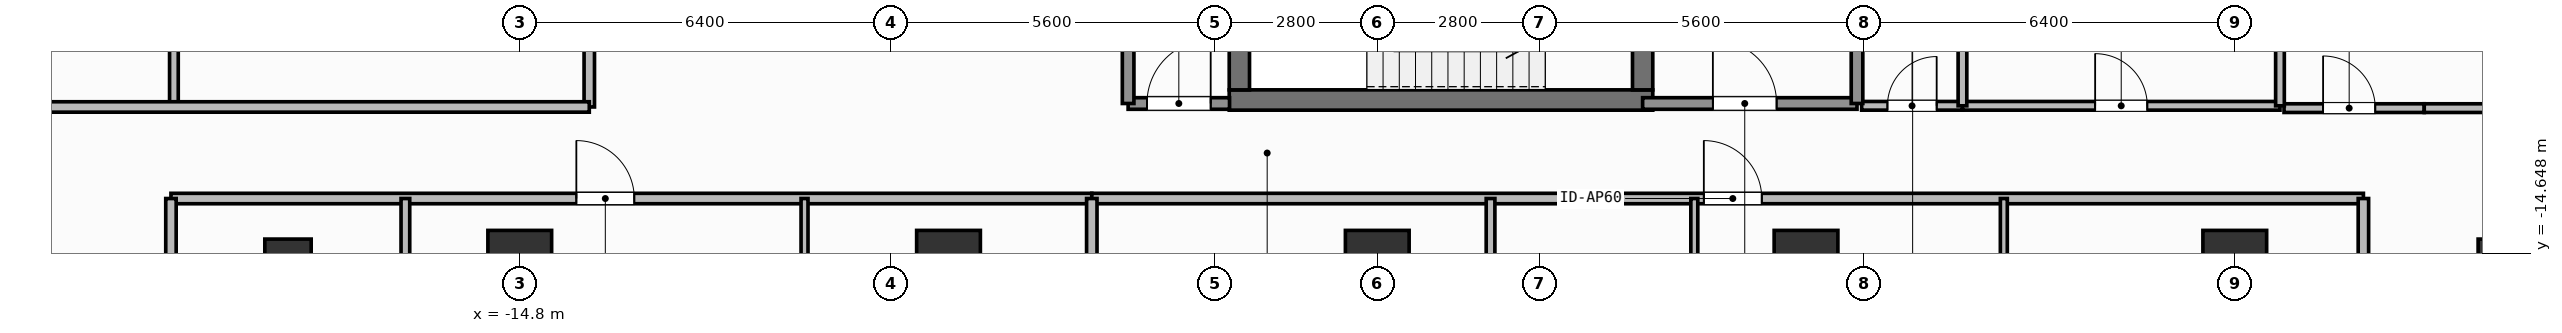
"""IFC4 building model, lengths in metres.
Left out: names, types, materials, properties, quantities, classifications, styles, units other than length and angle.
Written with IfcOpenShell. Run it as: python <this file> out.ifc"""

import sys

from ifc_helpers import new_model, si_unit, direction, frame, frame_2d, origin, origin_2d, place, context, subcontext, project, spatial, rectangle, hollow_rectangle, extrude, element, fill, save


model = new_model("IFC4")
c1 = context("Model", 3, precision=1e-05, world=origin(), true_north=direction((0.0, 1.0)))
c2 = subcontext(c1, "Body", "Model", "MODEL_VIEW")
j1 = project(units=[si_unit("LENGTHUNIT", "METRE"), si_unit("PLANEANGLEUNIT", "RADIAN")], contexts=[c1])
p1 = place(None, origin())
s1 = spatial("IfcSite", under=j1, at=p1, CompositionType="ELEMENT")
p2 = place(p1, origin())
s2 = spatial("IfcBuilding", under=s1, at=p2, CompositionType="ELEMENT")
p3 = place(p2, frame((0.0, 0.0, 199.2)))
s3 = spatial("IfcBuildingStorey", under=s2, at=p3, CompositionType="ELEMENT", Elevation=199.2)
p4 = place(p3, frame((-2.555, -12.0, 0.0), z_axis=(0.0, 0.0, 1.0), x_axis=(1.0, 0.0, 0.0)))
e1 = element("IfcWall", 1, at=p4, inside=s3, PredefinedType="SHEAR", context=c2, shape_type="SweptSolid", body=[
    extrude(rectangle(XDim=7.31, YDim=0.35, at=frame_2d((3.655, 0.0))), origin(), (0.0, 0.0, 1.0), 3.9),
])
p5 = place(p3, frame((-2.38, -11.825, 0.0), z_axis=(0.0, 0.0, 1.0), x_axis=(0.0, 1.0, 0.0)))
e2 = element("IfcWall", 2, at=p5, inside=s3, PredefinedType="SHEAR", context=c2, shape_type="SweptSolid", body=[
    extrude(rectangle(XDim=2.925, YDim=0.35, at=frame_2d((1.462, 0.0))), origin(), (0.0, 0.0, 1.0), 3.9),
])
p6 = place(p3, frame((4.58, -8.9, 0.0), z_axis=(0.0, 0.0, 1.0), x_axis=(0.0, -1.0, 0.0)))
e3 = element("IfcWall", 3, at=p6, inside=s3, PredefinedType="SHEAR", context=c2, shape_type="SweptSolid", body=[
    extrude(rectangle(XDim=2.925, YDim=0.35, at=frame_2d((1.462, 0.0))), origin(), (0.0, 0.0, 1.0), 3.9),
])
p7 = place(p6, frame((0.913, 0.0, 0.0)))
e4 = element("IfcOpeningElement", 4, at=p7, cuts=e3, PredefinedType="OPENING", context=c2, shape_type="SweptSolid", body=[
    extrude(rectangle(XDim=1.1, YDim=2.15, at=frame_2d((0.55, 1.075))), frame((0.0, 0.185, 0.0), z_axis=(0.0, -1.0, 0.0), x_axis=(1.0, 0.0, 0.0)), (0.0, 0.0, 1.0), 0.37),
])
for number, where, z_axis, x_axis in (
    (5, (-14.8, -14.8, 0.0), (0.0, 0.0, 1.0), (1.0, 0.0, 0.0)),
    (6, (-7.4, -14.8, 0.0), (0.0, 0.0, 1.0), (1.0, 0.0, 0.0)),
    (7, (0.0, -14.8, 0.0), (0.0, 0.0, 1.0), (1.0, 0.0, 0.0)),
    (8, (7.4, -14.8, 0.0), (0.0, 0.0, 1.0), (1.0, 0.0, 0.0)),
    (9, (14.8, -14.8, 0.0), (0.0, 0.0, 1.0), (1.0, 0.0, 0.0)),
):
    element("IfcColumn", number, at=place(p3, frame(where, z_axis=z_axis, x_axis=x_axis)), inside=s3, PredefinedType="COLUMN", context=c2, shape_type="SweptSolid", body=[
        extrude(rectangle(XDim=1.1, YDim=1.1, at=origin_2d()), origin(), (0.0, 0.0, 1.0), 3.9),
    ])
for number, where, z_axis, x_axis in (
    (10, (-18.8, -14.8, 0.0), (0.0, 0.0, 1.0), (1.0, 0.0, 0.0)),
    (11, (19.4, -14.8, 0.0), (0.0, 0.0, 1.0), (1.0, 0.0, 0.0)),
):
    element("IfcColumn", number, at=place(p3, frame(where, z_axis=z_axis, x_axis=x_axis)), inside=s3, PredefinedType="COLUMN", context=c2, shape_type="SweptSolid", body=[
        extrude(hollow_rectangle(XDim=0.8, YDim=0.8, WallThickness=0.036, at=origin_2d()), origin(), (0.0, 0.0, 1.0), 3.9),
    ])
p8 = place(p3, frame((4.58, -12.06, 0.0), z_axis=(0.0, 0.0, 1.0), x_axis=(1.0, 0.0, 0.0)))
e12 = element("IfcWall", 12, at=p8, inside=s3, PredefinedType="SOLIDWALL", context=c2, shape_type="SweptSolid", body=[
    extrude(rectangle(XDim=3.7, YDim=0.2, at=frame_2d((1.85, 0.0))), origin(), (0.0, 0.0, 1.0), 3.68),
])
p9 = place(p8, frame((1.212, 0.0, 0.0)))
e13 = element("IfcOpeningElement", 13, at=p9, cuts=e12, PredefinedType="OPENING", context=c2, shape_type="SweptSolid", body=[
    extrude(rectangle(XDim=1.1, YDim=2.15, at=frame_2d((0.55, 1.075))), frame((0.0, 0.11, 0.0), z_axis=(0.0, -1.0, 0.0), x_axis=(1.0, 0.0, 0.0)), (0.0, 0.0, 1.0), 0.22),
])
p10 = place(p3, frame((-4.3, -12.06, 0.0), z_axis=(0.0, 0.0, 1.0), x_axis=(1.0, 0.0, 0.0)))
e14 = element("IfcWall", 14, at=p10, inside=s3, PredefinedType="SOLIDWALL", context=c2, shape_type="SweptSolid", body=[
    extrude(rectangle(XDim=1.75, YDim=0.2, at=frame_2d((0.875, 0.0))), origin(), (0.0, 0.0, 1.0), 3.68),
])
p11 = place(p10, frame((0.325, 0.0, 0.0)))
e15 = element("IfcOpeningElement", 15, at=p11, cuts=e14, PredefinedType="OPENING", context=c2, shape_type="SweptSolid", body=[
    extrude(rectangle(XDim=1.1, YDim=2.15, at=frame_2d((0.55, 1.075))), frame((0.0, 0.11, 0.0), z_axis=(0.0, -1.0, 0.0), x_axis=(1.0, 0.0, 0.0)), (0.0, 0.0, 1.0), 0.22),
])
p12 = place(p3, frame((8.36, -12.1, 0.0), z_axis=(0.0, 0.0, 1.0), x_axis=(1.0, 0.0, 0.0)))
e16 = element("IfcWall", 16, at=p12, inside=s3, PredefinedType="PARTITIONING", context=c2, shape_type="SweptSolid", body=[
    extrude(rectangle(XDim=1.74, YDim=0.15, at=frame_2d((0.87, 0.0))), origin(), (0.0, 0.0, 1.0), 3.68),
])
p13 = place(p12, frame((0.445, 0.0, 0.0)))
e17 = element("IfcOpeningElement", 17, at=p13, cuts=e16, PredefinedType="OPENING", context=c2, shape_type="SweptSolid", body=[
    extrude(rectangle(XDim=0.85, YDim=2.1, at=frame_2d((0.425, 1.05))), frame((0.0, 0.085, 0.0), z_axis=(0.0, -1.0, 0.0), x_axis=(1.0, 0.0, 0.0)), (0.0, 0.0, 1.0), 0.17),
])
p14 = place(p3, frame((10.1, -12.1, 0.0), z_axis=(0.0, 0.0, 1.0), x_axis=(1.0, 0.0, 0.0)))
e18 = element("IfcWall", 18, at=p14, inside=s3, PredefinedType="PARTITIONING", context=c2, shape_type="SweptSolid", body=[
    extrude(rectangle(XDim=5.48, YDim=0.15, at=frame_2d((2.74, 0.0))), origin(), (0.0, 0.0, 1.0), 3.68),
])
p15 = place(p14, frame((2.29, 0.0, 0.0)))
e19 = element("IfcOpeningElement", 19, at=p15, cuts=e18, PredefinedType="OPENING", context=c2, shape_type="SweptSolid", body=[
    extrude(rectangle(XDim=0.9, YDim=2.1, at=frame_2d((0.45, 1.05))), frame((0.0, 0.085, 0.0), z_axis=(0.0, -1.0, 0.0), x_axis=(1.0, 0.0, 0.0)), (0.0, 0.0, 1.0), 0.17),
])
p16 = place(p3, frame((-20.82, -13.7, 0.0), z_axis=(0.0, 0.0, 1.0), x_axis=(1.0, 0.0, 0.0)))
e20 = element("IfcWall", 20, at=p16, inside=s3, PredefinedType="PARTITIONING", context=c2, shape_type="SweptSolid", body=[
    extrude(rectangle(XDim=15.893, YDim=0.18, at=frame_2d((7.947, 0.0))), origin(), (0.0, 0.0, 1.0), 3.68),
])
p17 = place(p16, frame((6.997, 0.0, 0.0)))
e21 = element("IfcOpeningElement", 21, at=p17, cuts=e20, PredefinedType="OPENING", context=c2, shape_type="SweptSolid", body=[
    extrude(rectangle(XDim=1.0, YDim=2.2, at=frame_2d((0.5, 1.1))), frame((0.0, 0.1, 0.0), z_axis=(0.0, -1.0, 0.0), x_axis=(1.0, 0.0, 0.0)), (0.0, 0.0, 1.0), 0.2),
])
p18 = place(p3, frame((-16.774, -24.39, 0.0), z_axis=(0.0, 0.0, 1.0), x_axis=(0.0, 1.0, 0.0)))
e22 = element("IfcWall", 22, at=p18, inside=s3, PredefinedType="PARTITIONING", context=c2, shape_type="SweptSolid", body=[
    extrude(rectangle(XDim=10.69, YDim=0.15, at=frame_2d((5.345, 0.0))), origin(), (0.0, 0.0, 1.0), 3.68),
])
p19 = place(p18, frame((4.83, 0.0, 0.0)))
e23 = element("IfcOpeningElement", 23, at=p19, cuts=e22, PredefinedType="OPENING", context=c2, shape_type="SweptSolid", body=[
    extrude(rectangle(XDim=0.85, YDim=2.1, at=frame_2d((0.425, 1.05))), frame((0.0, 0.085, 0.0), z_axis=(0.0, -1.0, 0.0), x_axis=(1.0, 0.0, 0.0)), (0.0, 0.0, 1.0), 0.17),
])
p20 = place(p3, frame((-9.885, -18.19, 0.0), z_axis=(0.0, 0.0, 1.0), x_axis=(0.0, 1.0, 0.0)))
e24 = element("IfcWall", 24, at=p20, inside=s3, PredefinedType="PARTITIONING", context=c2, shape_type="SweptSolid", body=[
    extrude(rectangle(XDim=4.49, YDim=0.12, at=frame_2d((2.245, 0.0))), origin(), (0.0, 0.0, 1.0), 3.68),
])
p21 = place(p20, frame((1.907, 0.0, 0.0)))
e25 = element("IfcOpeningElement", 25, at=p21, cuts=e24, PredefinedType="OPENING", context=c2, shape_type="SweptSolid", body=[
    extrude(rectangle(XDim=0.85, YDim=2.1, at=frame_2d((0.425, 1.05))), frame((0.0, 0.07, 0.0), z_axis=(0.0, -1.0, 0.0), x_axis=(1.0, 0.0, 0.0)), (0.0, 0.0, 1.0), 0.14),
])
p22 = place(p3, frame((-4.927, -13.7, 0.0), z_axis=(0.0, 0.0, 1.0), x_axis=(1.0, 0.0, 0.0)))
e26 = element("IfcWall", 26, at=p22, inside=s3, PredefinedType="PARTITIONING", context=c2, shape_type="SweptSolid", body=[
    extrude(rectangle(XDim=21.947, YDim=0.18, at=frame_2d((10.974, 0.0))), origin(), (0.0, 0.0, 1.0), 3.68),
])
p23 = place(p22, frame((10.563, 0.0, 0.0)))
e27 = element("IfcOpeningElement", 27, at=p23, cuts=e26, PredefinedType="OPENING", context=c2, shape_type="SweptSolid", body=[
    extrude(rectangle(XDim=1.0, YDim=2.2, at=frame_2d((0.5, 1.1))), frame((0.0, 0.1, 0.0), z_axis=(0.0, -1.0, 0.0), x_axis=(1.0, 0.0, 0.0)), (0.0, 0.0, 1.0), 0.2),
])
p24 = place(p3, frame((5.472, -24.39, 0.0), z_axis=(0.0, 0.0, 1.0), x_axis=(0.0, 1.0, 0.0)))
e28 = element("IfcWall", 28, at=p24, inside=s3, PredefinedType="PARTITIONING", context=c2, shape_type="SweptSolid", body=[
    extrude(rectangle(XDim=10.69, YDim=0.12, at=frame_2d((5.345, 0.0))), origin(), (0.0, 0.0, 1.0), 3.68),
])
p25 = place(p24, frame((4.806, 0.0, 0.0)))
e29 = element("IfcOpeningElement", 29, at=p25, cuts=e28, PredefinedType="OPENING", context=c2, shape_type="SweptSolid", body=[
    extrude(rectangle(XDim=0.9, YDim=2.1, at=frame_2d((0.45, 1.05))), frame((0.0, 0.07, 0.0), z_axis=(0.0, -1.0, 0.0), x_axis=(1.0, 0.0, 0.0)), (0.0, 0.0, 1.0), 0.14),
])
p26 = place(p3, frame((1.955, -19.45, 0.0), z_axis=(0.0, 0.0, 1.0), x_axis=(0.0, 1.0, 0.0)))
e30 = element("IfcWall", 30, at=p26, inside=s3, PredefinedType="PARTITIONING", context=c2, shape_type="SweptSolid", body=[
    extrude(rectangle(XDim=5.75, YDim=0.15, at=frame_2d((2.875, 0.0))), origin(), (0.0, 0.0, 1.0), 3.68),
])
p27 = place(p26, frame((2.45, 0.0, 0.0)))
e31 = element("IfcOpeningElement", 31, at=p27, cuts=e30, PredefinedType="OPENING", context=c2, shape_type="SweptSolid", body=[
    extrude(rectangle(XDim=0.85, YDim=2.1, at=frame_2d((0.425, 1.05))), frame((0.0, 0.085, 0.0), z_axis=(0.0, -1.0, 0.0), x_axis=(1.0, 0.0, 0.0)), (0.0, 0.0, 1.0), 0.17),
])
p28 = place(p3, frame((10.814, -18.19, 0.0), z_axis=(0.0, 0.0, 1.0), x_axis=(0.0, 1.0, 0.0)))
e32 = element("IfcWall", 32, at=p28, inside=s3, PredefinedType="PARTITIONING", context=c2, shape_type="SweptSolid", body=[
    extrude(rectangle(XDim=4.49, YDim=0.12, at=frame_2d((2.245, 0.0))), origin(), (0.0, 0.0, 1.0), 3.68),
])
p29 = place(p28, frame((1.907, 0.0, 0.0)))
e33 = element("IfcOpeningElement", 33, at=p29, cuts=e32, PredefinedType="OPENING", context=c2, shape_type="SweptSolid", body=[
    extrude(rectangle(XDim=0.85, YDim=2.1, at=frame_2d((0.425, 1.05))), frame((0.0, 0.07, 0.0), z_axis=(0.0, -1.0, 0.0), x_axis=(1.0, 0.0, 0.0)), (0.0, 0.0, 1.0), 0.14),
])
p30 = place(p3, frame((-13.6, -12.12, 0.0), z_axis=(0.0, 0.0, 1.0), x_axis=(0.0, 1.0, 0.0)))
e34 = element("IfcWall", 34, at=p30, inside=s3, PredefinedType="PARTITIONING", context=c2, shape_type="SweptSolid", body=[
    extrude(rectangle(XDim=12.764, YDim=0.18, at=frame_2d((6.382, 0.0))), origin(), (0.0, 0.0, 1.0), 3.68),
])
p31 = place(p30, frame((5.346, 0.0, 0.0)))
e35 = element("IfcOpeningElement", 35, at=p31, cuts=e34, PredefinedType="OPENING", context=c2, shape_type="SweptSolid", body=[
    extrude(rectangle(XDim=1.0, YDim=2.2, at=frame_2d((0.5, 1.1))), frame((0.0, 0.1, 0.0), z_axis=(0.0, -1.0, 0.0), x_axis=(1.0, 0.0, 0.0)), (0.0, 0.0, 1.0), 0.2),
])
p32 = place(p3, frame((15.65, -12.14, 0.0), z_axis=(0.0, 0.0, 1.0), x_axis=(1.0, 0.0, 0.0)))
e36 = element("IfcWall", 36, at=p32, inside=s3, PredefinedType="PARTITIONING", context=c2, shape_type="SweptSolid", body=[
    extrude(rectangle(XDim=2.42, YDim=0.15, at=frame_2d((1.21, 0.0))), origin(), (0.0, 0.0, 1.0), 3.68),
])
p33 = place(p32, frame((0.674, 0.0, 0.0)))
e37 = element("IfcOpeningElement", 37, at=p33, cuts=e36, PredefinedType="OPENING", context=c2, shape_type="SweptSolid", body=[
    extrude(rectangle(XDim=0.9, YDim=2.1, at=frame_2d((0.45, 1.05))), frame((0.0, 0.085, 0.0), z_axis=(0.0, -1.0, 0.0), x_axis=(1.0, 0.0, 0.0)), (0.0, 0.0, 1.0), 0.17),
])
for number, where, z_axis, x_axis in (
    (38, (8.28, -12.06, 0.0), (0.0, 0.0, 1.0), (0.0, 1.0, 0.0)),
    (39, (-4.3, -12.06, 0.0), (0.0, 0.0, 1.0), (0.0, 1.0, 0.0)),
):
    element("IfcWall", number, at=place(p3, frame(where, z_axis=z_axis, x_axis=x_axis)), inside=s3, PredefinedType="SOLIDWALL", context=c2, shape_type="SweptSolid", body=[
        extrude(rectangle(XDim=3.26, YDim=0.2, at=frame_2d((1.63, 0.0))), origin(), (0.0, 0.0, 1.0), 3.68),
    ])
p34 = place(p3, frame((10.1, -12.1, 0.0), z_axis=(0.0, 0.0, 1.0), x_axis=(0.0, 1.0, 0.0)))
e40 = element("IfcWall", 40, at=p34, inside=s3, PredefinedType="PARTITIONING", context=c2, shape_type="SweptSolid", body=[
    extrude(rectangle(XDim=2.35, YDim=0.15, at=frame_2d((1.175, 0.0))), origin(), (0.0, 0.0, 1.0), 3.68),
])
p35 = place(p3, frame((15.58, -12.1, 0.0), z_axis=(0.0, 0.0, 1.0), x_axis=(0.0, 1.0, 0.0)))
e41 = element("IfcWall", 41, at=p35, inside=s3, PredefinedType="PARTITIONING", context=c2, shape_type="SweptSolid", body=[
    extrude(rectangle(XDim=6.25, YDim=0.15, at=frame_2d((3.125, 0.0))), origin(), (0.0, 0.0, 1.0), 3.68),
])
p36 = place(p3, frame((-4.927, -28.63, 0.0), z_axis=(0.0, 0.0, 1.0), x_axis=(0.0, 1.0, 0.0)))
e42 = element("IfcWall", 42, at=p36, inside=s3, PredefinedType="PARTITIONING", context=c2, shape_type="SweptSolid", body=[
    extrude(rectangle(XDim=14.93, YDim=0.18, at=frame_2d((7.465, 0.0))), origin(), (0.0, 0.0, 1.0), 3.68),
])
for number, where, z_axis, x_axis in (
    (43, (-20.82, -27.51, 0.0), (0.0, 0.0, 1.0), (0.0, 1.0, 0.0)),
    (44, (17.02, -27.51, 0.0), (0.0, 0.0, 1.0), (0.0, 1.0, 0.0)),
):
    element("IfcWall", number, at=place(p3, frame(where, z_axis=z_axis, x_axis=x_axis)), inside=s3, PredefinedType="PARTITIONING", context=c2, shape_type="SweptSolid", body=[
        extrude(rectangle(XDim=13.81, YDim=0.18, at=frame_2d((6.905, 0.0))), origin(), (0.0, 0.0, 1.0), 3.68),
    ])
p37 = place(p3, frame((-20.769, -12.12, 0.0), z_axis=(0.0, 0.0, 1.0), x_axis=(0.0, 1.0, 0.0)))
e45 = element("IfcWall", 45, at=p37, inside=s3, PredefinedType="PARTITIONING", context=c2, shape_type="SweptSolid", body=[
    extrude(rectangle(XDim=3.284, YDim=0.15, at=frame_2d((1.642, 0.0))), origin(), (0.0, 0.0, 1.0), 3.68),
])
p38 = place(p3, frame((-24.13, -12.12, 0.0), z_axis=(0.0, 0.0, 1.0), x_axis=(1.0, 0.0, 0.0)))
e46 = element("IfcWall", 46, at=p38, inside=s3, PredefinedType="PARTITIONING", context=c2, shape_type="SweptSolid", body=[
    extrude(rectangle(XDim=10.53, YDim=0.18, at=frame_2d((5.265, 0.0))), origin(), (0.0, 0.0, 1.0), 3.68),
])
p39 = place(p3, frame((18.07, -12.14, 0.0), z_axis=(0.0, 0.0, 1.0), x_axis=(1.0, 0.0, 0.0)))
e47 = element("IfcWall", 47, at=p39, inside=s3, PredefinedType="PARTITIONING", context=c2, shape_type="SweptSolid", body=[
    extrude(rectangle(XDim=2.26, YDim=0.15, at=frame_2d((1.13, 0.0))), origin(), (0.0, 0.0, 1.0), 3.68),
])
p40 = place(p9, origin())
e48 = element("IfcDoor", 48, at=p40, inside=s3, OperationType="SINGLE_SWING_LEFT", PredefinedType="DOOR", context=c2, shape_type="SweptSolid", body=[
    extrude(rectangle(XDim=1.1, YDim=2.15, at=frame_2d((0.55, 1.075))), frame((0.0, 0.025, 0.0), z_axis=(0.0, -1.0, 0.0), x_axis=(1.0, 0.0, 0.0)), (0.0, 0.0, 1.0), 0.05),
])
fill(e13, e48)
p41 = place(p11, origin())
e49 = element("IfcDoor", 49, at=p41, inside=s3, OperationType="SINGLE_SWING_RIGHT", PredefinedType="DOOR", context=c2, shape_type="SweptSolid", body=[
    extrude(rectangle(XDim=1.1, YDim=2.15, at=frame_2d((0.55, 1.075))), frame((0.0, 0.025, 0.0), z_axis=(0.0, -1.0, 0.0), x_axis=(1.0, 0.0, 0.0)), (0.0, 0.0, 1.0), 0.05),
])
fill(e15, e49)
p42 = place(p13, origin())
e50 = element("IfcDoor", 50, at=p42, inside=s3, OperationType="SINGLE_SWING_RIGHT", PredefinedType="DOOR", context=c2, shape_type="SweptSolid", body=[
    extrude(rectangle(XDim=0.85, YDim=2.1, at=frame_2d((0.425, 1.05))), frame((0.0, 0.025, 0.0), z_axis=(0.0, -1.0, 0.0), x_axis=(1.0, 0.0, 0.0)), (0.0, 0.0, 1.0), 0.05),
])
fill(e17, e50)
p43 = place(p15, origin())
e51 = element("IfcDoor", 51, at=p43, inside=s3, OperationType="SINGLE_SWING_LEFT", PredefinedType="DOOR", context=c2, shape_type="SweptSolid", body=[
    extrude(rectangle(XDim=0.9, YDim=2.1, at=frame_2d((0.45, 1.05))), frame((0.0, 0.025, 0.0), z_axis=(0.0, -1.0, 0.0), x_axis=(1.0, 0.0, 0.0)), (0.0, 0.0, 1.0), 0.05),
])
fill(e19, e51)
p44 = place(p17, origin())
e52 = element("IfcDoor", 52, at=p44, inside=s3, OperationType="SINGLE_SWING_LEFT", PredefinedType="DOOR", context=c2, shape_type="SweptSolid", body=[
    extrude(rectangle(XDim=1.0, YDim=2.2, at=frame_2d((0.5, 1.1))), frame((0.0, 0.025, 0.0), z_axis=(0.0, -1.0, 0.0), x_axis=(1.0, 0.0, 0.0)), (0.0, 0.0, 1.0), 0.05),
])
fill(e21, e52)
p45 = place(p23, origin())
e53 = element("IfcDoor", 53, at=p45, inside=s3, OperationType="SINGLE_SWING_LEFT", PredefinedType="DOOR", context=c2, shape_type="SweptSolid", body=[
    extrude(rectangle(XDim=1.0, YDim=2.2, at=frame_2d((0.5, 1.1))), frame((0.0, 0.025, 0.0), z_axis=(0.0, -1.0, 0.0), x_axis=(1.0, 0.0, 0.0)), (0.0, 0.0, 1.0), 0.05),
])
fill(e27, e53)
p46 = place(p33, origin())
e54 = element("IfcDoor", 54, at=p46, inside=s3, OperationType="SINGLE_SWING_LEFT", PredefinedType="DOOR", context=c2, shape_type="SweptSolid", body=[
    extrude(rectangle(XDim=0.9, YDim=2.1, at=frame_2d((0.45, 1.05))), frame((0.0, 0.025, 0.0), z_axis=(0.0, -1.0, 0.0), x_axis=(1.0, 0.0, 0.0)), (0.0, 0.0, 1.0), 0.05),
])
fill(e37, e54)
save(model, sys.argv[1])
